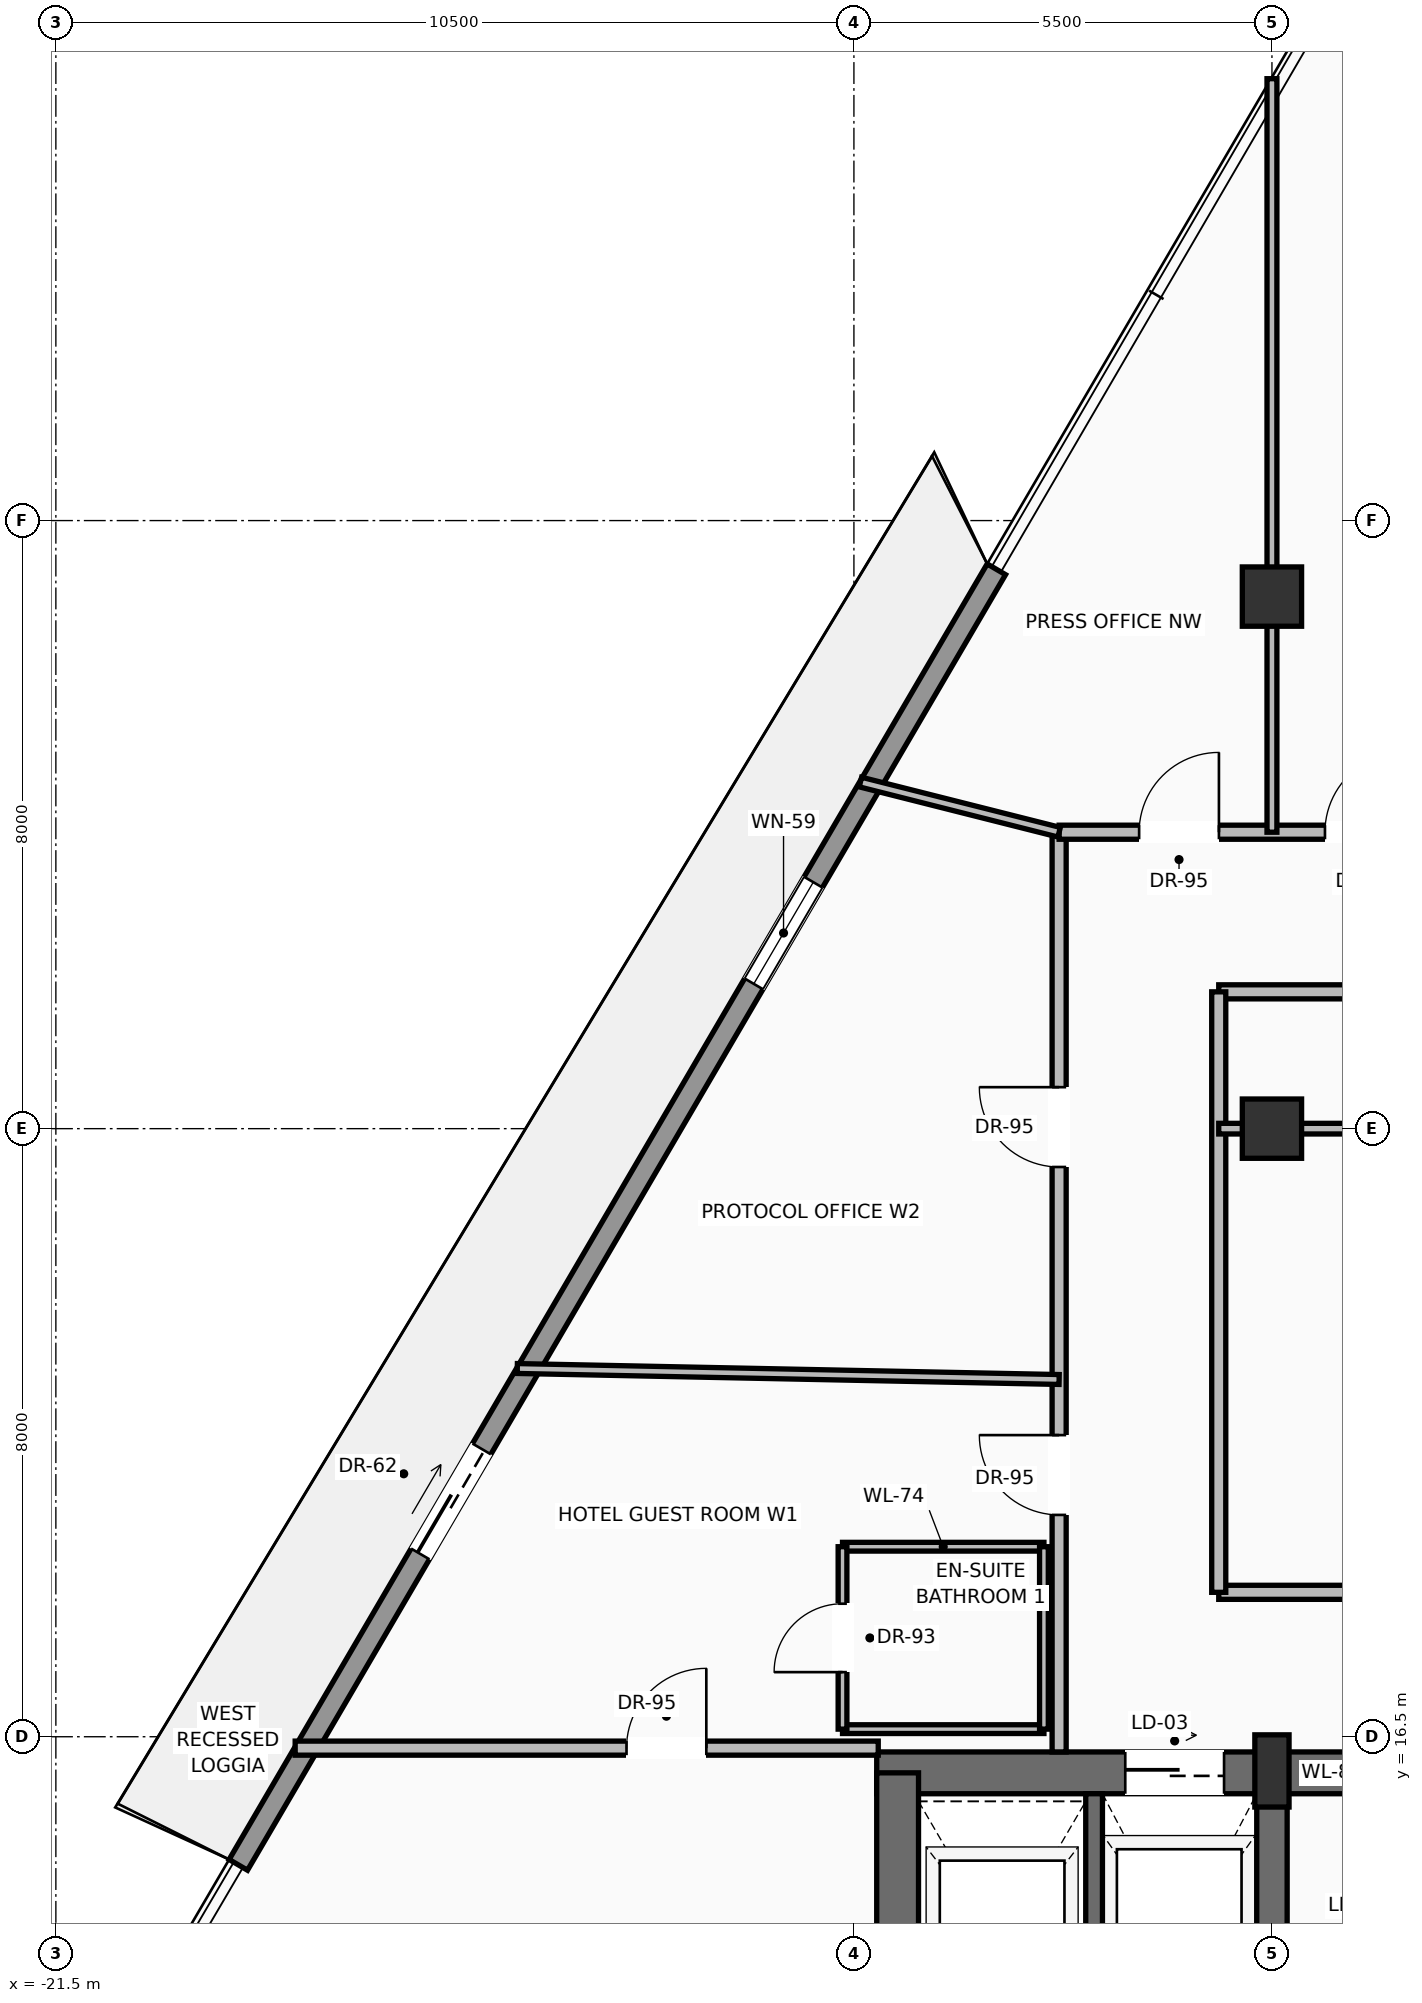
"""IFC4 building model, lengths in metres.
Left out: names, types, materials, properties, quantities, classifications, styles, units other than length and angle.
Written with IfcOpenShell. Run it as: python <this file> out.ifc"""

import sys

from ifc_helpers import new_model, si_unit, direction, frame, frame_2d, origin, origin_2d, place, context, subcontext, project, spatial, rectangle, extrude, source, transform, mapped, element, fill, save


model = new_model("IFC4")
c1 = context("Model", 3, precision=1e-05, world=origin(), true_north=direction((0.0, 1.0)))
c2 = subcontext(c1, "Body", "Model", "MODEL_VIEW")
j1 = project(units=[si_unit("LENGTHUNIT", "METRE"), si_unit("PLANEANGLEUNIT", "RADIAN")], contexts=[c1])
p1 = place(None, origin())
s1 = spatial("IfcSite", under=j1, at=p1, CompositionType="ELEMENT")
p2 = place(p1, origin())
s2 = spatial("IfcBuilding", under=s1, at=p2, CompositionType="ELEMENT")
p3 = place(p2, frame((0.0, 0.0, 251.05)))
s3 = spatial("IfcBuildingStorey", under=s2, at=p3, CompositionType="ELEMENT", Elevation=251.05)
p4 = place(p3, frame((-10.7, 16.025, 0.0), z_axis=(0.0, 0.0, 1.0), x_axis=(1.0, 0.0, 0.0)))
e1 = element("IfcWall", 1, at=p4, inside=s3, PredefinedType="SHEAR", context=c2, shape_type="SweptSolid", body=[
    extrude(rectangle(XDim=21.4, YDim=0.55, at=frame_2d((10.7, 0.0))), origin(), (0.0, 0.0, 1.0), 3.24),
])
p5 = place(p4, frame((3.27, 0.0, 0.0)))
e2 = element("IfcOpeningElement", 2, at=p5, cuts=e1, PredefinedType="OPENING", context=c2, shape_type="SweptSolid", body=[
    extrude(rectangle(XDim=1.3, YDim=2.3, at=frame_2d((0.65, 1.15))), frame((0.0, 0.285, 0.0), z_axis=(0.0, -1.0, 0.0), x_axis=(1.0, 0.0, 0.0)), (0.0, 0.0, 1.0), 0.57),
])
p6 = place(p4, frame((9.7, 0.0, 0.0)))
e3 = element("IfcOpeningElement", 3, at=p6, cuts=e1, PredefinedType="OPENING", context=c2, shape_type="SweptSolid", body=[
    extrude(rectangle(XDim=2.0, YDim=2.4, at=frame_2d((1.0, 1.2))), frame((0.0, 0.285, 0.0), z_axis=(0.0, -1.0, 0.0), x_axis=(1.0, 0.0, 0.0)), (0.0, 0.0, 1.0), 0.57),
])
p7 = place(p3, frame((-10.425, 0.575, 0.0), z_axis=(0.0, 0.0, 1.0), x_axis=(0.0, 1.0, 0.0)))
e4 = element("IfcWall", 4, at=p7, inside=s3, PredefinedType="SHEAR", context=c2, shape_type="SweptSolid", body=[
    extrude(rectangle(XDim=15.45, YDim=0.55, at=frame_2d((7.725, 0.0))), origin(), (0.0, 0.0, 1.0), 3.24),
])
p8 = place(p3, frame((-5.5, 0.575, 0.0), z_axis=(0.0, 0.0, 1.0), x_axis=(0.0, 1.0, 0.0)))
e5 = element("IfcWall", 5, at=p8, inside=s3, PredefinedType="SHEAR", context=c2, shape_type="SweptSolid", body=[
    extrude(rectangle(XDim=15.45, YDim=0.4, at=frame_2d((7.725, 0.0))), origin(), (0.0, 0.0, 1.0), 3.24),
])
p9 = place(p8, frame((8.925, 0.0, 0.0)))
e6 = element("IfcOpeningElement", 6, at=p9, cuts=e5, PredefinedType="OPENING", context=c2, shape_type="SweptSolid", body=[
    extrude(rectangle(XDim=1.1, YDim=2.2, at=frame_2d((0.55, 1.1))), frame((0.0, 0.21, 0.0), z_axis=(0.0, -1.0, 0.0), x_axis=(1.0, 0.0, 0.0)), (0.0, 0.0, 1.0), 0.42),
])
m1 = source(origin(), c2, "Body", "SweptSolid", [
    extrude(rectangle(XDim=0.45, YDim=0.95, at=origin_2d()), origin(), (0.0, 0.0, 1.0), 3.45),
])
p10 = place(p3, frame((-5.5, 16.05, 0.0), z_axis=(0.0, 0.0, 1.0), x_axis=(1.0, 0.0, 0.0)))
e7 = element("IfcColumn", 7, at=p10, inside=s3, PredefinedType="PILASTER", context=c2, shape_type="MappedRepresentation", body=[
    mapped(m1, transform((0.0, 0.0, 0.0), scale=1.0)),
])
m2 = source(origin(), c2, "Body", "SweptSolid", [
    extrude(rectangle(XDim=0.78, YDim=0.78, at=origin_2d()), origin(), (0.0, 0.0, 1.0), 3.45),
])
for number, where, z_axis, x_axis in (
    (8, (-5.5, 24.5, 0.0), (0.0, 0.0, 1.0), (1.0, 0.0, 0.0)),
    (9, (-5.5, 31.5, 0.0), (0.0, 0.0, 1.0), (1.0, 0.0, 0.0)),
):
    element("IfcColumn", number, at=place(p3, frame(where, z_axis=z_axis, x_axis=x_axis)), inside=s3, PredefinedType="COLUMN", context=c2, shape_type="MappedRepresentation", body=[
        mapped(m2, transform((0.0, 0.0, 0.0), scale=1.0)),
    ])
p11 = place(p3, frame((-19.099, 14.814, 0.0), z_axis=(0.0, 0.0, 1.0), x_axis=(0.505023562938, 0.863105556046, 0.0)))
e10 = element("IfcWall", 10, at=p11, inside=s3, PredefinedType="SOLIDWALL", context=c2, shape_type="SweptSolid", body=[
    extrude(rectangle(XDim=19.748, YDim=0.28, at=frame_2d((9.874, 0.0))), origin(), (0.0, 0.0, 1.0), 2.82),
])
p12 = place(p11, frame((4.74, 0.0, 0.0)))
e11 = element("IfcOpeningElement", 11, at=p12, cuts=e10, PredefinedType="OPENING", context=c2, shape_type="SweptSolid", body=[
    extrude(rectangle(XDim=1.6, YDim=2.35, at=frame_2d((0.8, 1.175))), frame((0.0, 0.15, 0.0), z_axis=(0.0, -1.0, 0.0), x_axis=(1.0, 0.0, 0.0)), (0.0, 0.0, 1.0), 0.3),
])
p13 = place(p11, frame((13.429, 0.0, 0.9)))
e12 = element("IfcOpeningElement", 12, at=p13, cuts=e10, PredefinedType="OPENING", context=c2, shape_type="SweptSolid", body=[
    extrude(rectangle(XDim=1.55, YDim=1.75, at=frame_2d((0.775, 0.875))), frame((0.0, 0.15, 0.0), z_axis=(0.0, -1.0, 0.0), x_axis=(1.0, 0.0, 0.0)), (0.0, 0.0, 1.0), 0.3),
])
p14 = place(p3, frame((-7.84, 11.87, 0.0), z_axis=(0.0, 0.0, 1.0), x_axis=(0.0, 1.0, 0.0)))
e13 = element("IfcWall", 13, at=p14, inside=s3, PredefinedType="SOLIDWALL", context=c2, shape_type="SweptSolid", body=[
    extrude(rectangle(XDim=3.88, YDim=0.22, at=frame_2d((1.94, 0.0))), origin(), (0.0, 0.0, 1.0), 3.24),
])
p15 = place(p3, frame((-6.2, 18.4, 0.0), z_axis=(0.0, 0.0, 1.0), x_axis=(1.0, 0.0, 0.0)))
e14 = element("IfcWall", 14, at=p15, inside=s3, PredefinedType="PARTITIONING", context=c2, shape_type="SweptSolid", body=[
    extrude(rectangle(XDim=12.6, YDim=0.185, at=frame_2d((6.3, 0.0))), origin(), (0.0, 0.0, 1.0), 3.232),
])
p16 = place(p15, frame((5.825, 0.0, 0.0)))
e15 = element("IfcOpeningElement", 15, at=p16, cuts=e14, PredefinedType="OPENING", context=c2, shape_type="SweptSolid", body=[
    extrude(rectangle(XDim=0.95, YDim=2.2, at=frame_2d((0.475, 1.1))), frame((0.0, 0.103, 0.0), z_axis=(0.0, -1.0, 0.0), x_axis=(1.0, 0.0, 0.0)), (0.0, 0.0, 1.0), 0.205),
])
p17 = place(p3, frame((-6.2, 26.3, 0.0), z_axis=(0.0, 0.0, 1.0), x_axis=(1.0, 0.0, 0.0)))
e16 = element("IfcWall", 16, at=p17, inside=s3, PredefinedType="PARTITIONING", context=c2, shape_type="SweptSolid", body=[
    extrude(rectangle(XDim=12.6, YDim=0.185, at=frame_2d((6.3, 0.0))), origin(), (0.0, 0.0, 1.0), 3.232),
])
p18 = place(p17, frame((5.825, 0.0, 0.0)))
e17 = element("IfcOpeningElement", 17, at=p18, cuts=e16, PredefinedType="OPENING", context=c2, shape_type="SweptSolid", body=[
    extrude(rectangle(XDim=0.95, YDim=2.2, at=frame_2d((0.475, 1.1))), frame((0.0, 0.103, 0.0), z_axis=(0.0, -1.0, 0.0), x_axis=(1.0, 0.0, 0.0)), (0.0, 0.0, 1.0), 0.205),
])
p19 = place(p3, frame((-6.2, 18.4, 0.0), z_axis=(0.0, 0.0, 1.0), x_axis=(0.0, 1.0, 0.0)))
e18 = element("IfcWall", 18, at=p19, inside=s3, PredefinedType="PARTITIONING", context=c2, shape_type="SweptSolid", body=[
    extrude(rectangle(XDim=7.9, YDim=0.185, at=frame_2d((3.95, 0.0))), origin(), (0.0, 0.0, 1.0), 3.232),
])
p20 = place(p3, frame((-8.3, 16.3, 0.0), z_axis=(0.0, 0.0, 1.0), x_axis=(0.0, 1.0, 0.0)))
e19 = element("IfcWall", 19, at=p20, inside=s3, PredefinedType="PARTITIONING", context=c2, shape_type="SweptSolid", body=[
    extrude(rectangle(XDim=12.1, YDim=0.185, at=frame_2d((6.05, 0.0))), origin(), (0.0, 0.0, 1.0), 3.232),
])
p21 = place(p20, frame((3.118, 0.0, 0.0)))
e20 = element("IfcOpeningElement", 20, at=p21, cuts=e19, PredefinedType="OPENING", context=c2, shape_type="SweptSolid", body=[
    extrude(rectangle(XDim=1.05, YDim=2.25, at=frame_2d((0.525, 1.125))), frame((0.0, 0.103, 0.0), z_axis=(0.0, -1.0, 0.0), x_axis=(1.0, 0.0, 0.0)), (0.0, 0.0, 1.0), 0.205),
])
p22 = place(p20, frame((7.696, 0.0, 0.0)))
e21 = element("IfcOpeningElement", 21, at=p22, cuts=e19, PredefinedType="OPENING", context=c2, shape_type="SweptSolid", body=[
    extrude(rectangle(XDim=1.05, YDim=2.25, at=frame_2d((0.525, 1.125))), frame((0.0, 0.103, 0.0), z_axis=(0.0, -1.0, 0.0), x_axis=(1.0, 0.0, 0.0)), (0.0, 0.0, 1.0), 0.205),
])
p23 = place(p3, frame((-8.3, 28.4, 0.0), z_axis=(0.0, 0.0, 1.0), x_axis=(1.0, 0.0, 0.0)))
e22 = element("IfcWall", 22, at=p23, inside=s3, PredefinedType="PARTITIONING", context=c2, shape_type="SweptSolid", body=[
    extrude(rectangle(XDim=16.8, YDim=0.185, at=frame_2d((8.4, 0.0))), origin(), (0.0, 0.0, 1.0), 3.232),
])
p24 = place(p23, frame((3.498, 0.0, 0.0)))
e23 = element("IfcOpeningElement", 23, at=p24, cuts=e22, PredefinedType="OPENING", context=c2, shape_type="SweptSolid", body=[
    extrude(rectangle(XDim=1.05, YDim=2.25, at=frame_2d((0.525, 1.125))), frame((0.0, 0.103, 0.0), z_axis=(0.0, -1.0, 0.0), x_axis=(1.0, 0.0, 0.0)), (0.0, 0.0, 1.0), 0.205),
])
p25 = place(p23, frame((8.998, 0.0, 0.0)))
e24 = element("IfcOpeningElement", 24, at=p25, cuts=e22, PredefinedType="OPENING", context=c2, shape_type="SweptSolid", body=[
    extrude(rectangle(XDim=1.05, YDim=2.25, at=frame_2d((0.525, 1.125))), frame((0.0, 0.103, 0.0), z_axis=(0.0, -1.0, 0.0), x_axis=(1.0, 0.0, 0.0)), (0.0, 0.0, 1.0), 0.205),
])
p26 = place(p23, frame((12.052, 0.0, 0.0)))
e25 = element("IfcOpeningElement", 25, at=p26, cuts=e22, PredefinedType="OPENING", context=c2, shape_type="SweptSolid", body=[
    extrude(rectangle(XDim=1.05, YDim=2.25, at=frame_2d((0.525, 1.125))), frame((0.0, 0.103, 0.0), z_axis=(0.0, -1.0, 0.0), x_axis=(1.0, 0.0, 0.0)), (0.0, 0.0, 1.0), 0.205),
])
p27 = place(p23, frame((14.498, 0.0, 0.0)))
e26 = element("IfcOpeningElement", 26, at=p27, cuts=e22, PredefinedType="OPENING", context=c2, shape_type="SweptSolid", body=[
    extrude(rectangle(XDim=1.05, YDim=2.25, at=frame_2d((0.525, 1.125))), frame((0.0, 0.103, 0.0), z_axis=(0.0, -1.0, 0.0), x_axis=(1.0, 0.0, 0.0)), (0.0, 0.0, 1.0), 0.205),
])
p28 = place(p23, frame((1.052, 0.0, 0.0)))
e27 = element("IfcOpeningElement", 27, at=p28, cuts=e22, PredefinedType="OPENING", context=c2, shape_type="SweptSolid", body=[
    extrude(rectangle(XDim=1.05, YDim=2.25, at=frame_2d((0.525, 1.125))), frame((0.0, 0.103, 0.0), z_axis=(0.0, -1.0, 0.0), x_axis=(1.0, 0.0, 0.0)), (0.0, 0.0, 1.0), 0.205),
])
p29 = place(p3, frame((-6.2, 24.5, 0.0), z_axis=(0.0, 0.0, 1.0), x_axis=(1.0, 0.0, 0.0)))
e28 = element("IfcWall", 28, at=p29, inside=s3, PredefinedType="PARTITIONING", context=c2, shape_type="SweptSolid", body=[
    extrude(rectangle(XDim=12.6, YDim=0.14, at=frame_2d((6.3, 0.0))), origin(), (0.0, 0.0, 1.0), 2.683),
])
p30 = place(p3, frame((-18.352, 16.35, 0.0), z_axis=(0.0, 0.0, 1.0), x_axis=(1.0, 0.0, 0.0)))
e29 = element("IfcWall", 29, at=p30, inside=s3, PredefinedType="PARTITIONING", context=c2, shape_type="SweptSolid", body=[
    extrude(rectangle(XDim=7.672, YDim=0.185, at=frame_2d((3.836, 0.0))), origin(), (0.0, 0.0, 1.0), 3.232),
])
p31 = place(p30, frame((4.36, 0.0, 0.0)))
e30 = element("IfcOpeningElement", 30, at=p31, cuts=e29, PredefinedType="OPENING", context=c2, shape_type="SweptSolid", body=[
    extrude(rectangle(XDim=1.05, YDim=2.25, at=frame_2d((0.525, 1.125))), frame((0.0, 0.103, 0.0), z_axis=(0.0, -1.0, 0.0), x_axis=(1.0, 0.0, 0.0)), (0.0, 0.0, 1.0), 0.205),
])
p32 = place(p3, frame((-10.915, 29.06, 0.0), z_axis=(0.0, 0.0, 1.0), x_axis=(0.969591453575, -0.244729265012, 0.0)))
e31 = element("IfcWall", 31, at=p32, inside=s3, PredefinedType="PARTITIONING", context=c2, shape_type="SweptSolid", body=[
    extrude(rectangle(XDim=2.697, YDim=0.13, at=frame_2d((1.348, 0.0))), origin(), (0.0, 0.0, 1.0), 3.232),
])
p33 = place(p3, frame((-5.5, 28.4, 0.0), z_axis=(0.0, 0.0, 1.0), x_axis=(0.0, 1.0, 0.0)))
e32 = element("IfcWall", 32, at=p33, inside=s3, PredefinedType="PARTITIONING", context=c2, shape_type="SweptSolid", body=[
    extrude(rectangle(XDim=9.914, YDim=0.13, at=frame_2d((4.957, 0.0))), origin(), (0.0, 0.0, 1.0), 2.683),
])
for number, where, z_axis, x_axis in (
    (33, (-11.15, 16.6, 0.0), (0.0, 0.0, 1.0), (1.0, 0.0, 0.0)),
    (34, (-11.15, 19.0, 0.0), (0.0, 0.0, 1.0), (1.0, 0.0, 0.0)),
):
    element("IfcWall", number, at=place(p3, frame(where, z_axis=z_axis, x_axis=x_axis)), inside=s3, PredefinedType="PARTITIONING", context=c2, shape_type="SweptSolid", body=[
        extrude(rectangle(XDim=2.65, YDim=0.115, at=frame_2d((1.325, 0.0))), origin(), (0.0, 0.0, 1.0), 3.232),
    ])
p34 = place(p3, frame((-11.15, 16.6, 0.0), z_axis=(0.0, 0.0, 1.0), x_axis=(0.0, 1.0, 0.0)))
e35 = element("IfcWall", 35, at=p34, inside=s3, PredefinedType="PARTITIONING", context=c2, shape_type="SweptSolid", body=[
    extrude(rectangle(XDim=2.4, YDim=0.115, at=frame_2d((1.2, 0.0))), origin(), (0.0, 0.0, 1.0), 3.232),
])
p35 = place(p34, frame((0.75, 0.0, 0.0)))
e36 = element("IfcOpeningElement", 36, at=p35, cuts=e35, PredefinedType="OPENING", context=c2, shape_type="SweptSolid", body=[
    extrude(rectangle(XDim=0.9, YDim=2.15, at=frame_2d((0.45, 1.075))), frame((0.0, 0.067, 0.0), z_axis=(0.0, -1.0, 0.0), x_axis=(1.0, 0.0, 0.0)), (0.0, 0.0, 1.0), 0.135),
])
p36 = place(p3, frame((-8.5, 16.6, 0.0), z_axis=(0.0, 0.0, 1.0), x_axis=(0.0, 1.0, 0.0)))
e37 = element("IfcWall", 37, at=p36, inside=s3, PredefinedType="PARTITIONING", context=c2, shape_type="SweptSolid", body=[
    extrude(rectangle(XDim=2.4, YDim=0.115, at=frame_2d((1.2, 0.0))), origin(), (0.0, 0.0, 1.0), 3.232),
])
p37 = place(p3, frame((-15.429, 21.344, 0.0), z_axis=(0.0, 0.0, 1.0), x_axis=(0.999794560419, -0.020269113379, 0.0)))
e38 = element("IfcWall", 38, at=p37, inside=s3, PredefinedType="PARTITIONING", context=c2, shape_type="SweptSolid", body=[
    extrude(rectangle(XDim=7.131, YDim=0.13, at=frame_2d((3.565, 0.0))), origin(), (0.0, 0.0, 1.0), 3.232),
])
m3 = source(origin(), c2, "Body", "SweptSolid", [
    extrude(rectangle(XDim=1.6, YDim=2.35, at=frame_2d((0.8, 1.175))), frame((0.0, 0.025, 0.0), z_axis=(0.0, -1.0, 0.0), x_axis=(1.0, 0.0, 0.0)), (0.0, 0.0, 1.0), 0.05),
])
p38 = place(p12, origin())
e39 = element("IfcDoor", 39, at=p38, inside=s3, OperationType="SLIDING_TO_LEFT", PredefinedType="DOOR", context=c2, shape_type="MappedRepresentation", body=[
    mapped(m3, transform((0.0, 0.0, 0.0), scale=1.0)),
])
fill(e11, e39)
m4 = source(origin(), c2, "Body", "SweptSolid", [
    extrude(rectangle(XDim=1.55, YDim=1.75, at=frame_2d((0.775, 0.875))), frame((0.0, 0.03, 0.0), z_axis=(0.0, -1.0, 0.0), x_axis=(1.0, 0.0, 0.0)), (0.0, 0.0, 1.0), 0.06),
])
p39 = place(p13, origin())
e40 = element("IfcWindow", 40, at=p39, inside=s3, PartitioningType="SINGLE_PANEL", PredefinedType="WINDOW", context=c2, shape_type="MappedRepresentation", body=[
    mapped(m4, transform((0.0, 0.0, 0.0), scale=1.0)),
])
fill(e12, e40)
m5 = source(origin(), c2, "Body", "SweptSolid", [
    extrude(rectangle(XDim=1.3, YDim=2.3, at=frame_2d((0.65, 1.15))), frame((0.0, 0.025, 0.0), z_axis=(0.0, -1.0, 0.0), x_axis=(1.0, 0.0, 0.0)), (0.0, 0.0, 1.0), 0.05),
])
p40 = place(p5, origin())
e41 = element("IfcDoor", 41, at=p40, inside=s3, OperationType="SLIDING_TO_RIGHT", PredefinedType="DOOR", context=c2, shape_type="MappedRepresentation", body=[
    mapped(m5, transform((0.0, 0.0, 0.0), scale=1.0)),
])
fill(e2, e41)
m6 = source(origin(), c2, "Body", "SweptSolid", [
    extrude(rectangle(XDim=1.05, YDim=2.25, at=frame_2d((0.525, 1.125))), frame((0.0, 0.025, 0.0), z_axis=(0.0, -1.0, 0.0), x_axis=(1.0, 0.0, 0.0)), (0.0, 0.0, 1.0), 0.05),
])
p41 = place(p31, origin())
e42 = element("IfcDoor", 42, at=p41, inside=s3, OperationType="SINGLE_SWING_RIGHT", PredefinedType="DOOR", context=c2, shape_type="MappedRepresentation", body=[
    mapped(m6, transform((0.0, 0.0, 0.0), scale=1.0)),
])
fill(e30, e42)
p42 = place(p21, origin())
e43 = element("IfcDoor", 43, at=p42, inside=s3, OperationType="SINGLE_SWING_RIGHT", PredefinedType="DOOR", context=c2, shape_type="MappedRepresentation", body=[
    mapped(m6, transform((0.0, 0.0, 0.0), scale=1.0)),
])
fill(e20, e43)
m7 = source(origin(), c2, "Body", "SweptSolid", [
    extrude(rectangle(XDim=0.9, YDim=2.15, at=frame_2d((0.45, 1.075))), frame((0.0, 0.025, 0.0), z_axis=(0.0, -1.0, 0.0), x_axis=(1.0, 0.0, 0.0)), (0.0, 0.0, 1.0), 0.05),
])
p43 = place(p35, origin())
e44 = element("IfcDoor", 44, at=p43, inside=s3, OperationType="SINGLE_SWING_LEFT", PredefinedType="DOOR", context=c2, shape_type="MappedRepresentation", body=[
    mapped(m7, transform((0.0, 0.0, 0.0), scale=1.0)),
])
fill(e36, e44)
p44 = place(p22, origin())
e45 = element("IfcDoor", 45, at=p44, inside=s3, OperationType="SINGLE_SWING_RIGHT", PredefinedType="DOOR", context=c2, shape_type="MappedRepresentation", body=[
    mapped(m6, transform((0.0, 0.0, 0.0), scale=1.0)),
])
fill(e21, e45)
p45 = place(p24, origin())
e46 = element("IfcDoor", 46, at=p45, inside=s3, OperationType="SINGLE_SWING_RIGHT", PredefinedType="DOOR", context=c2, shape_type="MappedRepresentation", body=[
    mapped(m6, transform((0.0, 0.0, 0.0), scale=1.0)),
])
fill(e23, e46)
p46 = place(p28, origin())
e47 = element("IfcDoor", 47, at=p46, inside=s3, OperationType="SINGLE_SWING_RIGHT", PredefinedType="DOOR", context=c2, shape_type="MappedRepresentation", body=[
    mapped(m6, transform((0.0, 0.0, 0.0), scale=1.0)),
])
fill(e27, e47)
save(model, sys.argv[1])
